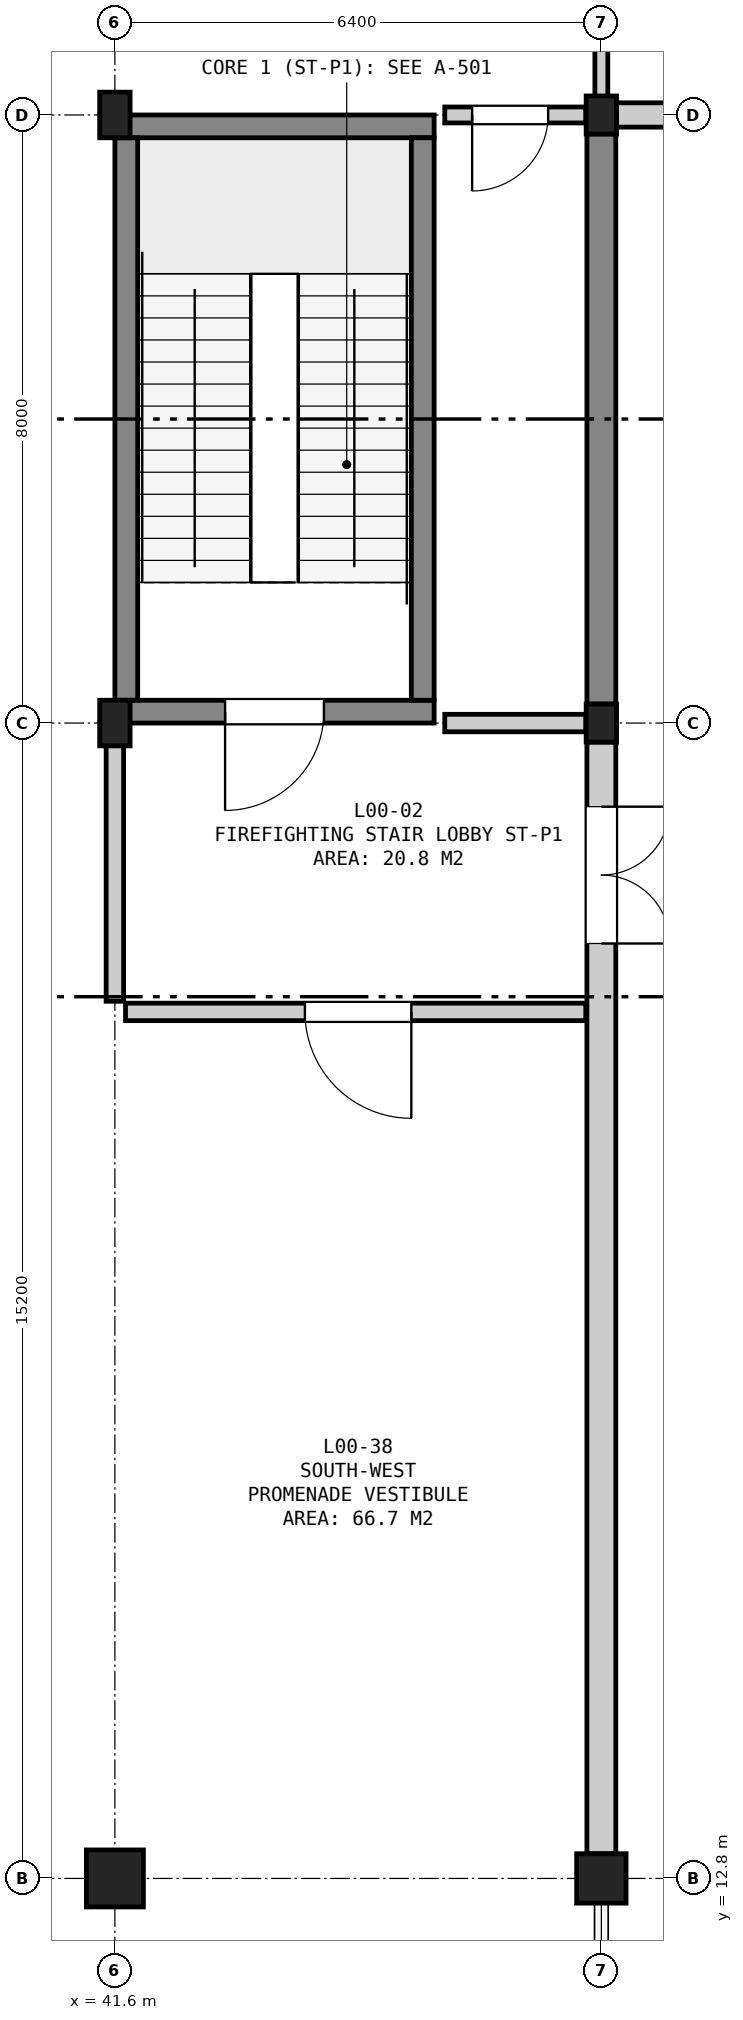
"""IFC4 building model, lengths in metres.
Left out: names, types, materials, properties, quantities, classifications, styles, units other than length and angle.
Written with IfcOpenShell. Run it as: python <this file> out.ifc"""

import sys

from ifc_helpers import new_model, si_unit, direction, frame, frame_2d, origin, origin_2d, place, context, subcontext, project, spatial, rectangle, extrude, element, fill, save


model = new_model("IFC4")
c1 = context("Model", 3, precision=1e-05, world=origin(), true_north=direction((0.0, 1.0)))
c2 = subcontext(c1, "Body", "Model", "MODEL_VIEW")
j1 = project(units=[si_unit("LENGTHUNIT", "METRE"), si_unit("PLANEANGLEUNIT", "RADIAN")], contexts=[c1])
p1 = place(None, origin())
s1 = spatial("IfcSite", under=j1, at=p1, CompositionType="ELEMENT")
p2 = place(p1, origin())
s2 = spatial("IfcBuilding", under=s1, at=p2, CompositionType="ELEMENT")
p3 = place(p2, origin())
s3 = spatial("IfcBuildingStorey", under=s2, at=p3, CompositionType="ELEMENT", Elevation=0.0)
p4 = place(p3, frame((41.6, 12.8, 0.0), z_axis=(0.0, 0.0, 1.0), x_axis=(1.0, 0.0, 0.0)))
e1 = element("IfcColumn", 1, at=p4, inside=s3, PredefinedType="COLUMN", context=c2, shape_type="SweptSolid", body=[
    extrude(rectangle(XDim=0.75, YDim=0.75, at=origin_2d()), origin(), (0.0, 0.0, 1.0), 5.4),
])
for number, where, z_axis, x_axis in (
    (2, (41.6, 28.0, 0.0), (0.0, 0.0, 1.0), (1.0, 0.0, 0.0)),
    (3, (41.6, 36.0, 0.0), (0.0, 0.0, 1.0), (1.0, 0.0, 0.0)),
):
    element("IfcColumn", number, at=place(p3, frame(where, z_axis=z_axis, x_axis=x_axis)), inside=s3, PredefinedType="COLUMN", context=c2, shape_type="SweptSolid", body=[
        extrude(rectangle(XDim=0.4, YDim=0.6, at=origin_2d()), origin(), (0.0, 0.0, 1.0), 5.4),
    ])
p5 = place(p3, frame((48.0, 12.8, 0.0), z_axis=(0.0, 0.0, 1.0), x_axis=(1.0, 0.0, 0.0)))
e4 = element("IfcColumn", 4, at=p5, inside=s3, PredefinedType="COLUMN", context=c2, shape_type="SweptSolid", body=[
    extrude(rectangle(XDim=0.65, YDim=0.65, at=origin_2d()), origin(), (0.0, 0.0, 1.0), 5.4),
])
for number, where, z_axis, x_axis in (
    (5, (48.0, 28.0, 0.0), (0.0, 0.0, 1.0), (1.0, 0.0, 0.0)),
    (6, (48.0, 36.0, 0.0), (0.0, 0.0, 1.0), (1.0, 0.0, 0.0)),
):
    element("IfcColumn", number, at=place(p3, frame(where, z_axis=z_axis, x_axis=x_axis)), inside=s3, PredefinedType="COLUMN", context=c2, shape_type="SweptSolid", body=[
        extrude(rectangle(XDim=0.4, YDim=0.5, at=origin_2d()), origin(), (0.0, 0.0, 1.0), 5.4),
    ])
p6 = place(p3, frame((48.0, 13.125, 0.0), z_axis=(0.0, 0.0, 1.0), x_axis=(0.0, 1.0, 0.0)))
e7 = element("IfcWall", 7, at=p6, inside=s3, PredefinedType="SOLIDWALL", context=c2, shape_type="SweptSolid", body=[
    extrude(rectangle(XDim=14.625, YDim=0.38, at=frame_2d((7.312, 0.0))), origin(), (0.0, 0.0, 1.0), 4.065),
])
p7 = place(p6, frame((11.975, 0.0, 0.0)))
e8 = element("IfcOpeningElement", 8, at=p7, cuts=e7, PredefinedType="OPENING", context=c2, shape_type="SweptSolid", body=[
    extrude(rectangle(XDim=1.8, YDim=2.25, at=frame_2d((0.9, 1.125))), frame((0.0, 0.202, 0.0), z_axis=(0.0, -1.0, 0.0), x_axis=(1.0, 0.0, 0.0)), (0.0, 0.0, 1.0), 0.404),
])
p8 = place(p3, frame((48.0, 28.25, 0.0), z_axis=(0.0, 0.0, 1.0), x_axis=(0.0, 1.0, 0.0)))
e9 = element("IfcWall", 9, at=p8, inside=s3, PredefinedType="SOLIDWALL", context=c2, shape_type="SweptSolid", body=[
    extrude(rectangle(XDim=7.5, YDim=0.38, at=frame_2d((3.75, 0.0))), origin(), (0.0, 0.0, 1.0), 4.555),
])
p9 = place(p3, frame((48.2, 36.0, 0.0), z_axis=(0.0, 0.0, 1.0), x_axis=(1.0, 0.0, 0.0)))
e10 = element("IfcWall", 10, at=p9, inside=s3, PredefinedType="SOLIDWALL", context=c2, shape_type="SweptSolid", body=[
    extrude(rectangle(XDim=5.775, YDim=0.32, at=frame_2d((2.888, 0.0))), origin(), (0.0, 0.0, 1.0), 4.48),
])
p10 = place(p9, frame((1.688, 0.0, 0.9)))
e11 = element("IfcOpeningElement", 11, at=p10, cuts=e10, PredefinedType="OPENING", context=c2, shape_type="SweptSolid", body=[
    extrude(rectangle(XDim=2.4, YDim=2.2, at=frame_2d((1.2, 1.1))), frame((0.0, 0.172, 0.0), z_axis=(0.0, -1.0, 0.0), x_axis=(1.0, 0.0, 0.0)), (0.0, 0.0, 1.0), 0.344),
])
p11 = place(p3, frame((41.6, 28.15, 0.0), z_axis=(0.0, 0.0, 1.0), x_axis=(1.0, 0.0, 0.0)))
e12 = element("IfcWall", 12, at=p11, inside=s3, PredefinedType="SHEAR", context=c2, shape_type="SweptSolid", body=[
    extrude(rectangle(XDim=4.2, YDim=0.3, at=frame_2d((2.1, 0.0))), origin(), (0.0, 0.0, 1.0), 5.08),
])
p12 = place(p11, frame((1.45, 0.0, 0.0)))
e13 = element("IfcOpeningElement", 13, at=p12, cuts=e12, PredefinedType="OPENING", context=c2, shape_type="SweptSolid", body=[
    extrude(rectangle(XDim=1.3, YDim=2.18, at=frame_2d((0.65, 1.09))), frame((0.0, 0.162, 0.0), z_axis=(0.0, -1.0, 0.0), x_axis=(1.0, 0.0, 0.0)), (0.0, 0.0, 1.0), 0.324),
])
p13 = place(p3, frame((41.6, 35.85, 0.0), z_axis=(0.0, 0.0, 1.0), x_axis=(1.0, 0.0, 0.0)))
e14 = element("IfcWall", 14, at=p13, inside=s3, PredefinedType="SHEAR", context=c2, shape_type="SweptSolid", body=[
    extrude(rectangle(XDim=4.2, YDim=0.3, at=frame_2d((2.1, 0.0))), origin(), (0.0, 0.0, 1.0), 5.08),
])
for number, where, z_axis, x_axis in (
    (15, (41.75, 28.3, 0.0), (0.0, 0.0, 1.0), (0.0, 1.0, 0.0)),
    (16, (45.65, 28.3, 0.0), (0.0, 0.0, 1.0), (0.0, 1.0, 0.0)),
):
    element("IfcWall", number, at=place(p3, frame(where, z_axis=z_axis, x_axis=x_axis)), inside=s3, PredefinedType="SHEAR", context=c2, shape_type="SweptSolid", body=[
        extrude(rectangle(XDim=7.4, YDim=0.3, at=frame_2d((3.7, 0.0))), origin(), (0.0, 0.0, 1.0), 5.08),
    ])
p14 = place(p3, frame((41.74, 24.2, 0.0), z_axis=(0.0, 0.0, 1.0), x_axis=(1.0, 0.0, 0.0)))
e17 = element("IfcWall", 17, at=p14, inside=s3, PredefinedType="SOLIDWALL", context=c2, shape_type="SweptSolid", body=[
    extrude(rectangle(XDim=6.055, YDim=0.23, at=frame_2d((3.027, 0.0))), origin(), (0.0, 0.0, 1.0), 5.08),
])
p15 = place(p14, frame((2.36, 0.0, 0.0)))
e18 = element("IfcOpeningElement", 18, at=p15, cuts=e17, PredefinedType="OPENING", context=c2, shape_type="SweptSolid", body=[
    extrude(rectangle(XDim=1.4, YDim=2.2, at=frame_2d((0.7, 1.1))), frame((0.0, 0.127, 0.0), z_axis=(0.0, -1.0, 0.0), x_axis=(1.0, 0.0, 0.0)), (0.0, 0.0, 1.0), 0.254),
])
p16 = place(p3, frame((45.94, 28.0, 0.0), z_axis=(0.0, 0.0, 1.0), x_axis=(1.0, 0.0, 0.0)))
e19 = element("IfcWall", 19, at=p16, inside=s3, PredefinedType="SOLIDWALL", context=c2, shape_type="SweptSolid", body=[
    extrude(rectangle(XDim=1.855, YDim=0.23, at=frame_2d((0.927, 0.0))), origin(), (0.0, 0.0, 1.0), 4.575),
])
p17 = place(p3, frame((41.6, 24.34, 0.0), z_axis=(0.0, 0.0, 1.0), x_axis=(0.0, 1.0, 0.0)))
e20 = element("IfcWall", 20, at=p17, inside=s3, PredefinedType="SOLIDWALL", context=c2, shape_type="SweptSolid", body=[
    extrude(rectangle(XDim=3.52, YDim=0.23, at=frame_2d((1.76, 0.0))), origin(), (0.0, 0.0, 1.0), 3.925),
])
p18 = place(p3, frame((45.94, 36.0, 0.0), z_axis=(0.0, 0.0, 1.0), x_axis=(1.0, 0.0, 0.0)))
e21 = element("IfcWall", 21, at=p18, inside=s3, PredefinedType="SOLIDWALL", context=c2, shape_type="SweptSolid", body=[
    extrude(rectangle(XDim=1.855, YDim=0.21, at=frame_2d((0.927, 0.0))), origin(), (0.0, 0.0, 1.0), 4.575),
])
p19 = place(p18, frame((0.36, 0.0, 0.0)))
e22 = element("IfcOpeningElement", 22, at=p19, cuts=e21, PredefinedType="OPENING", context=c2, shape_type="SweptSolid", body=[
    extrude(rectangle(XDim=1.0, YDim=2.15, at=frame_2d((0.5, 1.075))), frame((0.0, 0.117, 0.0), z_axis=(0.0, -1.0, 0.0), x_axis=(1.0, 0.0, 0.0)), (0.0, 0.0, 1.0), 0.234),
])
p20 = place(p3, frame((48.0, 36.205, 0.0), z_axis=(0.0, 0.0, 1.0), x_axis=(0.0, 1.0, 0.0)))
e23 = element("IfcWall", 23, at=p20, inside=s3, PredefinedType="PARTITIONING", context=c2, shape_type="SweptSolid", body=[
    extrude(rectangle(XDim=6.855, YDim=0.17, at=frame_2d((3.427, 0.0))), origin(), (0.0, 0.0, 1.0), 4.475),
])
p21 = place(p7, frame((1.8, 0.0, 0.0), z_axis=(0.0, 0.0, 1.0), x_axis=(-1.0, 0.0, 0.0)))
e24 = element("IfcDoor", 24, at=p21, inside=s3, OperationType="DOUBLE_DOOR_SINGLE_SWING", PredefinedType="DOOR", context=c2, shape_type="SweptSolid", body=[
    extrude(rectangle(XDim=1.8, YDim=2.25, at=frame_2d((0.9, 1.125))), frame((0.0, 0.025, 0.0), z_axis=(0.0, -1.0, 0.0), x_axis=(1.0, 0.0, 0.0)), (0.0, 0.0, 1.0), 0.05),
])
fill(e8, e24)
p22 = place(p12, frame((1.3, 0.0, 0.0), z_axis=(0.0, 0.0, 1.0), x_axis=(-1.0, 0.0, 0.0)))
e25 = element("IfcDoor", 25, at=p22, inside=s3, OperationType="SINGLE_SWING_RIGHT", PredefinedType="DOOR", context=c2, shape_type="SweptSolid", body=[
    extrude(rectangle(XDim=1.3, YDim=2.18, at=frame_2d((0.65, 1.09))), frame((0.0, 0.025, 0.0), z_axis=(0.0, -1.0, 0.0), x_axis=(1.0, 0.0, 0.0)), (0.0, 0.0, 1.0), 0.05),
])
fill(e13, e25)
p23 = place(p15, frame((1.4, 0.0, 0.0), z_axis=(0.0, 0.0, 1.0), x_axis=(-1.0, 0.0, 0.0)))
e26 = element("IfcDoor", 26, at=p23, inside=s3, OperationType="SINGLE_SWING_LEFT", PredefinedType="DOOR", context=c2, shape_type="SweptSolid", body=[
    extrude(rectangle(XDim=1.4, YDim=2.2, at=frame_2d((0.7, 1.1))), frame((0.0, 0.025, 0.0), z_axis=(0.0, -1.0, 0.0), x_axis=(1.0, 0.0, 0.0)), (0.0, 0.0, 1.0), 0.05),
])
fill(e18, e26)
p24 = place(p19, frame((1.0, 0.0, 0.0), z_axis=(0.0, 0.0, 1.0), x_axis=(-1.0, 0.0, 0.0)))
e27 = element("IfcDoor", 27, at=p24, inside=s3, OperationType="SINGLE_SWING_RIGHT", PredefinedType="DOOR", context=c2, shape_type="SweptSolid", body=[
    extrude(rectangle(XDim=1.0, YDim=2.15, at=frame_2d((0.5, 1.075))), frame((0.0, 0.025, 0.0), z_axis=(0.0, -1.0, 0.0), x_axis=(1.0, 0.0, 0.0)), (0.0, 0.0, 1.0), 0.05),
])
fill(e22, e27)
save(model, sys.argv[1])
